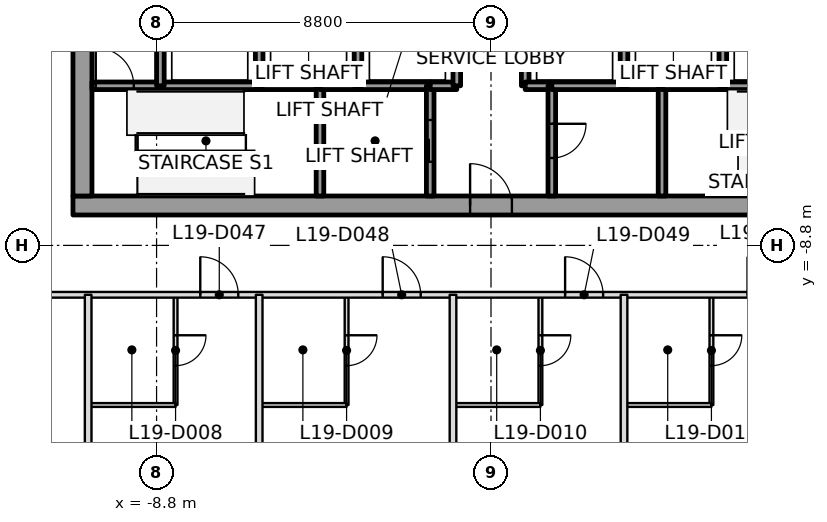
"""IFC4 building model, lengths in metres.
Left out: names, types, materials, properties, quantities, classifications, styles, units other than length and angle.
Written with IfcOpenShell. Run it as: python <this file> out.ifc"""

import sys

from ifc_helpers import new_model, si_unit, direction, frame, frame_2d, origin, place, context, subcontext, project, spatial, rectangle, extrude, element, fill, save


model = new_model("IFC4")
c1 = context("Model", 3, precision=1e-05, world=origin(), true_north=direction((0.0, 1.0)))
c2 = subcontext(c1, "Body", "Model", "MODEL_VIEW")
j1 = project(units=[si_unit("LENGTHUNIT", "METRE"), si_unit("PLANEANGLEUNIT", "RADIAN")], contexts=[c1])
p1 = place(None, origin())
s1 = spatial("IfcSite", under=j1, at=p1, CompositionType="ELEMENT")
p2 = place(p1, origin())
s2 = spatial("IfcBuilding", under=s1, at=p2, CompositionType="ELEMENT")
p3 = place(p2, frame((0.0, 0.0, 92.4)))
s3 = spatial("IfcBuildingStorey", under=s2, at=p3, CompositionType="ELEMENT", Elevation=92.4)
p4 = place(p3, frame((-11.0, -7.75, 0.0), z_axis=(0.0, 0.0, 1.0), x_axis=(1.0, 0.0, 0.0)))
e1 = element("IfcWall", 1, at=p4, inside=s3, PredefinedType="SHEAR", context=c2, shape_type="SweptSolid", body=[
    extrude(rectangle(XDim=22.0, YDim=0.5, at=frame_2d((11.0, 0.0))), origin(), (0.0, 0.0, 1.0), 3.7),
])
p5 = place(p4, frame((10.45, 0.0, 0.0)))
e2 = element("IfcOpeningElement", 2, at=p5, cuts=e1, PredefinedType="OPENING", context=c2, shape_type="SweptSolid", body=[
    extrude(rectangle(XDim=1.1, YDim=2.1, at=frame_2d((0.55, 1.05))), frame((0.0, 0.25, 0.0), z_axis=(0.0, -1.0, 0.0), x_axis=(1.0, 0.0, 0.0)), (0.0, 0.0, 1.0), 0.5),
])
p6 = place(p3, frame((-10.75, -7.5, 0.0), z_axis=(0.0, 0.0, 1.0), x_axis=(0.0, 1.0, 0.0)))
e3 = element("IfcWall", 3, at=p6, inside=s3, PredefinedType="SHEAR", context=c2, shape_type="SweptSolid", body=[
    extrude(rectangle(XDim=15.0, YDim=0.5, at=frame_2d((7.5, 0.0))), origin(), (0.0, 0.0, 1.0), 3.7),
])
p7 = place(p6, frame((6.6, 0.0, 0.0)))
e4 = element("IfcOpeningElement", 4, at=p7, cuts=e3, PredefinedType="OPENING", context=c2, shape_type="SweptSolid", body=[
    extrude(rectangle(XDim=1.8, YDim=2.1, at=frame_2d((0.9, 1.05))), frame((0.0, 0.25, 0.0), z_axis=(0.0, -1.0, 0.0), x_axis=(1.0, 0.0, 0.0)), (0.0, 0.0, 1.0), 0.5),
])
p8 = place(p3, frame((-10.5, -4.6, 0.0), z_axis=(0.0, 0.0, 1.0), x_axis=(1.0, 0.0, 0.0)))
e5 = element("IfcWall", 5, at=p8, inside=s3, PredefinedType="SOLIDWALL", context=c2, shape_type="SweptSolid", body=[
    extrude(rectangle(XDim=1.8, YDim=0.2, at=frame_2d((0.9, 0.0))), origin(), (0.0, 0.0, 1.0), 3.55),
])
p9 = place(p8, frame((0.1, 0.0, 0.0)))
e6 = element("IfcOpeningElement", 6, at=p9, cuts=e5, PredefinedType="OPENING", context=c2, shape_type="SweptSolid", body=[
    extrude(rectangle(XDim=1.0, YDim=2.1, at=frame_2d((0.5, 1.05))), frame((0.0, 0.1, 0.0), z_axis=(0.0, -1.0, 0.0), x_axis=(1.0, 0.0, 0.0)), (0.0, 0.0, 1.0), 0.2),
])
p10 = place(p3, frame((-8.7, -4.6, 0.0), z_axis=(0.0, 0.0, 1.0), x_axis=(1.0, 0.0, 0.0)))
e7 = element("IfcWall", 7, at=p10, inside=s3, PredefinedType="SOLIDWALL", context=c2, shape_type="SweptSolid", body=[
    extrude(rectangle(XDim=2.6, YDim=0.2, at=frame_2d((1.3, 0.0))), origin(), (0.0, 0.0, 1.0), 3.55),
])
p11 = place(p3, frame((-8.7, -4.6, 0.0), z_axis=(0.0, 0.0, 1.0), x_axis=(0.0, 1.0, 0.0)))
e8 = element("IfcWall", 8, at=p11, inside=s3, PredefinedType="SOLIDWALL", context=c2, shape_type="SweptSolid", body=[
    extrude(rectangle(XDim=2.8, YDim=0.2, at=frame_2d((1.4, 0.0))), origin(), (0.0, 0.0, 1.0), 3.55),
])
p12 = place(p3, frame((-6.1, -4.6, 0.0), z_axis=(0.0, 0.0, 1.0), x_axis=(1.0, 0.0, 0.0)))
e9 = element("IfcWall", 9, at=p12, inside=s3, PredefinedType="SOLIDWALL", context=c2, shape_type="SweptSolid", body=[
    extrude(rectangle(XDim=1.6, YDim=0.2, at=frame_2d((0.8, 0.0))), origin(), (0.0, 0.0, 1.0), 3.55),
])
p13 = place(p3, frame((-6.1, -4.6, 0.0), z_axis=(0.0, 0.0, 1.0), x_axis=(0.0, 1.0, 0.0)))
e10 = element("IfcWall", 10, at=p13, inside=s3, PredefinedType="SOLIDWALL", context=c2, shape_type="SweptSolid", body=[
    extrude(rectangle(XDim=2.8, YDim=0.2, at=frame_2d((1.4, 0.0))), origin(), (0.0, 0.0, 1.0), 3.55),
])
p14 = place(p3, frame((-4.5, -4.6, 0.0), z_axis=(0.0, 0.0, 1.0), x_axis=(0.0, -1.0, 0.0)))
e11 = element("IfcWall", 11, at=p14, inside=s3, PredefinedType="SOLIDWALL", context=c2, shape_type="SweptSolid", body=[
    extrude(rectangle(XDim=2.9, YDim=0.2, at=frame_2d((1.45, 0.0))), origin(), (0.0, 0.0, 1.0), 3.55),
])
p15 = place(p3, frame((-4.5, -4.6, 0.0), z_axis=(0.0, 0.0, 1.0), x_axis=(1.0, 0.0, 0.0)))
e12 = element("IfcWall", 12, at=p15, inside=s3, PredefinedType="SOLIDWALL", context=c2, shape_type="SweptSolid", body=[
    extrude(rectangle(XDim=1.0, YDim=0.2, at=frame_2d((0.5, 0.0))), origin(), (0.0, 0.0, 1.0), 3.55),
])
p16 = place(p3, frame((-3.5, -4.6, 0.0), z_axis=(0.0, 0.0, 1.0), x_axis=(1.0, 0.0, 0.0)))
e13 = element("IfcWall", 13, at=p16, inside=s3, PredefinedType="SOLIDWALL", context=c2, shape_type="SweptSolid", body=[
    extrude(rectangle(XDim=1.9, YDim=0.2, at=frame_2d((0.95, 0.0))), origin(), (0.0, 0.0, 1.0), 3.55),
])
p17 = place(p3, frame((-3.5, -4.6, 0.0), z_axis=(0.0, 0.0, 1.0), x_axis=(0.0, 1.0, 0.0)))
e14 = element("IfcWall", 14, at=p17, inside=s3, PredefinedType="SOLIDWALL", context=c2, shape_type="SweptSolid", body=[
    extrude(rectangle(XDim=2.8, YDim=0.2, at=frame_2d((1.4, 0.0))), origin(), (0.0, 0.0, 1.0), 3.55),
])
p18 = place(p3, frame((-1.6, -7.5, 0.0), z_axis=(0.0, 0.0, 1.0), x_axis=(0.0, 1.0, 0.0)))
e15 = element("IfcWall", 15, at=p18, inside=s3, PredefinedType="SOLIDWALL", context=c2, shape_type="SweptSolid", body=[
    extrude(rectangle(XDim=2.9, YDim=0.2, at=frame_2d((1.45, 0.0))), origin(), (0.0, 0.0, 1.0), 3.55),
])
p19 = place(p18, frame((0.9, 0.0, 0.0)))
e16 = element("IfcOpeningElement", 16, at=p19, cuts=e15, PredefinedType="OPENING", context=c2, shape_type="SweptSolid", body=[
    extrude(rectangle(XDim=1.1, YDim=2.1, at=frame_2d((0.55, 1.05))), frame((0.0, 0.1, 0.0), z_axis=(0.0, -1.0, 0.0), x_axis=(1.0, 0.0, 0.0)), (0.0, 0.0, 1.0), 0.2),
])
p20 = place(p3, frame((-1.6, -4.6, 0.0), z_axis=(0.0, 0.0, 1.0), x_axis=(1.0, 0.0, 0.0)))
e17 = element("IfcWall", 17, at=p20, inside=s3, PredefinedType="SOLIDWALL", context=c2, shape_type="SweptSolid", body=[
    extrude(rectangle(XDim=0.7, YDim=0.2, at=frame_2d((0.35, 0.0))), origin(), (0.0, 0.0, 1.0), 3.55),
])
for number, where, z_axis, x_axis in (
    (18, (-0.9, -4.6, 0.0), (0.0, 0.0, 1.0), (0.0, 1.0, 0.0)),
    (19, (0.9, -1.8, 0.0), (0.0, 0.0, 1.0), (0.0, -1.0, 0.0)),
):
    element("IfcWall", number, at=place(p3, frame(where, z_axis=z_axis, x_axis=x_axis)), inside=s3, PredefinedType="SOLIDWALL", context=c2, shape_type="SweptSolid", body=[
        extrude(rectangle(XDim=2.8, YDim=0.2, at=frame_2d((1.4, 0.0))), origin(), (0.0, 0.0, 1.0), 3.55),
    ])
p21 = place(p3, frame((0.9, -4.6, 0.0), z_axis=(0.0, 0.0, 1.0), x_axis=(1.0, 0.0, 0.0)))
e20 = element("IfcWall", 20, at=p21, inside=s3, PredefinedType="SOLIDWALL", context=c2, shape_type="SweptSolid", body=[
    extrude(rectangle(XDim=0.7, YDim=0.2, at=frame_2d((0.35, 0.0))), origin(), (0.0, 0.0, 1.0), 3.55),
])
p22 = place(p3, frame((1.6, -4.6, 0.0), z_axis=(0.0, 0.0, 1.0), x_axis=(0.0, -1.0, 0.0)))
e21 = element("IfcWall", 21, at=p22, inside=s3, PredefinedType="SOLIDWALL", context=c2, shape_type="SweptSolid", body=[
    extrude(rectangle(XDim=2.9, YDim=0.2, at=frame_2d((1.45, 0.0))), origin(), (0.0, 0.0, 1.0), 3.55),
])
p23 = place(p22, frame((1.0, 0.0, 0.0)))
e22 = element("IfcOpeningElement", 22, at=p23, cuts=e21, PredefinedType="OPENING", context=c2, shape_type="SweptSolid", body=[
    extrude(rectangle(XDim=0.9, YDim=2.1, at=frame_2d((0.45, 1.05))), frame((0.0, 0.1, 0.0), z_axis=(0.0, -1.0, 0.0), x_axis=(1.0, 0.0, 0.0)), (0.0, 0.0, 1.0), 0.2),
])
p24 = place(p3, frame((3.5, -4.6, 0.0), z_axis=(0.0, 0.0, 1.0), x_axis=(-1.0, 0.0, 0.0)))
e23 = element("IfcWall", 23, at=p24, inside=s3, PredefinedType="SOLIDWALL", context=c2, shape_type="SweptSolid", body=[
    extrude(rectangle(XDim=1.9, YDim=0.2, at=frame_2d((0.95, 0.0))), origin(), (0.0, 0.0, 1.0), 3.55),
])
p25 = place(p3, frame((4.5, -4.6, 0.0), z_axis=(0.0, 0.0, 1.0), x_axis=(-1.0, 0.0, 0.0)))
e24 = element("IfcWall", 24, at=p25, inside=s3, PredefinedType="SOLIDWALL", context=c2, shape_type="SweptSolid", body=[
    extrude(rectangle(XDim=1.0, YDim=0.2, at=frame_2d((0.5, 0.0))), origin(), (0.0, 0.0, 1.0), 3.55),
])
p26 = place(p3, frame((3.5, -4.6, 0.0), z_axis=(0.0, 0.0, 1.0), x_axis=(0.0, 1.0, 0.0)))
e25 = element("IfcWall", 25, at=p26, inside=s3, PredefinedType="SOLIDWALL", context=c2, shape_type="SweptSolid", body=[
    extrude(rectangle(XDim=2.8, YDim=0.2, at=frame_2d((1.4, 0.0))), origin(), (0.0, 0.0, 1.0), 3.55),
])
p27 = place(p3, frame((4.5, -7.5, 0.0), z_axis=(0.0, 0.0, 1.0), x_axis=(0.0, 1.0, 0.0)))
e26 = element("IfcWall", 26, at=p27, inside=s3, PredefinedType="SOLIDWALL", context=c2, shape_type="SweptSolid", body=[
    extrude(rectangle(XDim=2.9, YDim=0.2, at=frame_2d((1.45, 0.0))), origin(), (0.0, 0.0, 1.0), 3.55),
])
p28 = place(p3, frame((4.5, -4.6, 0.0), z_axis=(0.0, 0.0, 1.0), x_axis=(1.0, 0.0, 0.0)))
e27 = element("IfcWall", 27, at=p28, inside=s3, PredefinedType="SOLIDWALL", context=c2, shape_type="SweptSolid", body=[
    extrude(rectangle(XDim=1.6, YDim=0.2, at=frame_2d((0.8, 0.0))), origin(), (0.0, 0.0, 1.0), 3.55),
])
p29 = place(p3, frame((6.1, -4.6, 0.0), z_axis=(0.0, 0.0, 1.0), x_axis=(1.0, 0.0, 0.0)))
e28 = element("IfcWall", 28, at=p29, inside=s3, PredefinedType="SOLIDWALL", context=c2, shape_type="SweptSolid", body=[
    extrude(rectangle(XDim=2.6, YDim=0.2, at=frame_2d((1.3, 0.0))), origin(), (0.0, 0.0, 1.0), 3.55),
])
p30 = place(p3, frame((6.1, -4.6, 0.0), z_axis=(0.0, 0.0, 1.0), x_axis=(0.0, 1.0, 0.0)))
e29 = element("IfcWall", 29, at=p30, inside=s3, PredefinedType="SOLIDWALL", context=c2, shape_type="SweptSolid", body=[
    extrude(rectangle(XDim=2.8, YDim=0.2, at=frame_2d((1.4, 0.0))), origin(), (0.0, 0.0, 1.0), 3.55),
])
p31 = place(p3, frame((-10.6, -10.1, 0.0), z_axis=(0.0, 0.0, 1.0), x_axis=(0.0, -1.0, 0.0)))
e30 = element("IfcWall", 30, at=p31, inside=s3, PredefinedType="PARTITIONING", context=c2, shape_type="SweptSolid", body=[
    extrude(rectangle(XDim=12.268, YDim=0.175, at=frame_2d((6.134, 0.0))), origin(), (0.0, 0.0, 1.0), 2.934),
])
p32 = place(p3, frame((-6.1, -10.1, 0.0), z_axis=(0.0, 0.0, 1.0), x_axis=(0.0, -1.0, 0.0)))
e31 = element("IfcWall", 31, at=p32, inside=s3, PredefinedType="PARTITIONING", context=c2, shape_type="SweptSolid", body=[
    extrude(rectangle(XDim=12.547, YDim=0.175, at=frame_2d((6.273, 0.0))), origin(), (0.0, 0.0, 1.0), 2.934),
])
p33 = place(p3, frame((-1.0, -10.1, 0.0), z_axis=(0.0, 0.0, 1.0), x_axis=(0.0, -1.0, 0.0)))
e32 = element("IfcWall", 32, at=p33, inside=s3, PredefinedType="PARTITIONING", context=c2, shape_type="SweptSolid", body=[
    extrude(rectangle(XDim=12.678, YDim=0.175, at=frame_2d((6.339, 0.0))), origin(), (0.0, 0.0, 1.0), 2.934),
])
p34 = place(p3, frame((3.5, -10.1, 0.0), z_axis=(0.0, 0.0, 1.0), x_axis=(0.0, -1.0, 0.0)))
e33 = element("IfcWall", 33, at=p34, inside=s3, PredefinedType="PARTITIONING", context=c2, shape_type="SweptSolid", body=[
    extrude(rectangle(XDim=12.638, YDim=0.175, at=frame_2d((6.319, 0.0))), origin(), (0.0, 0.0, 1.0), 2.934),
])
p35 = place(p3, frame((-13.02, -10.1, 0.0), z_axis=(0.0, 0.0, 1.0), x_axis=(1.0, 0.0, 0.0)))
e34 = element("IfcWall", 34, at=p35, inside=s3, PredefinedType="PARTITIONING", context=c2, shape_type="SweptSolid", body=[
    extrude(rectangle(XDim=26.04, YDim=0.15, at=frame_2d((13.02, 0.0))), origin(), (0.0, 0.0, 1.0), 2.947),
])
p36 = place(p35, frame((5.37, 0.0, 0.0)))
e35 = element("IfcOpeningElement", 35, at=p36, cuts=e34, PredefinedType="OPENING", context=c2, shape_type="SweptSolid", body=[
    extrude(rectangle(XDim=1.0, YDim=2.1, at=frame_2d((0.5, 1.05))), frame((0.0, 0.075, 0.0), z_axis=(0.0, -1.0, 0.0), x_axis=(1.0, 0.0, 0.0)), (0.0, 0.0, 1.0), 0.15),
])
p37 = place(p35, frame((10.17, 0.0, 0.0)))
e36 = element("IfcOpeningElement", 36, at=p37, cuts=e34, PredefinedType="OPENING", context=c2, shape_type="SweptSolid", body=[
    extrude(rectangle(XDim=1.0, YDim=2.1, at=frame_2d((0.5, 1.05))), frame((0.0, 0.075, 0.0), z_axis=(0.0, -1.0, 0.0), x_axis=(1.0, 0.0, 0.0)), (0.0, 0.0, 1.0), 0.15),
])
p38 = place(p35, frame((14.97, 0.0, 0.0)))
e37 = element("IfcOpeningElement", 37, at=p38, cuts=e34, PredefinedType="OPENING", context=c2, shape_type="SweptSolid", body=[
    extrude(rectangle(XDim=1.0, YDim=2.1, at=frame_2d((0.5, 1.05))), frame((0.0, 0.075, 0.0), z_axis=(0.0, -1.0, 0.0), x_axis=(1.0, 0.0, 0.0)), (0.0, 0.0, 1.0), 0.15),
])
p39 = place(p35, frame((19.77, 0.0, 0.0)))
e38 = element("IfcOpeningElement", 38, at=p39, cuts=e34, PredefinedType="OPENING", context=c2, shape_type="SweptSolid", body=[
    extrude(rectangle(XDim=1.0, YDim=2.1, at=frame_2d((0.5, 1.05))), frame((0.0, 0.075, 0.0), z_axis=(0.0, -1.0, 0.0), x_axis=(1.0, 0.0, 0.0)), (0.0, 0.0, 1.0), 0.15),
])
p40 = place(p3, frame((-8.3, -10.13, 0.0), z_axis=(0.0, 0.0, 1.0), x_axis=(0.0, -1.0, 0.0)))
e39 = element("IfcWall", 39, at=p40, inside=s3, PredefinedType="PARTITIONING", context=c2, shape_type="SweptSolid", body=[
    extrude(rectangle(XDim=2.87, YDim=0.1, at=frame_2d((1.435, 0.0))), origin(), (0.0, 0.0, 1.0), 3.15),
])
p41 = place(p40, frame((1.035, 0.0, 0.0)))
e40 = element("IfcOpeningElement", 40, at=p41, cuts=e39, PredefinedType="OPENING", context=c2, shape_type="SweptSolid", body=[
    extrude(rectangle(XDim=0.8, YDim=2.1, at=frame_2d((0.4, 1.05))), frame((0.0, 0.05, 0.0), z_axis=(0.0, -1.0, 0.0), x_axis=(1.0, 0.0, 0.0)), (0.0, 0.0, 1.0), 0.1),
])
p42 = place(p3, frame((-8.3, -13.0, 0.0), z_axis=(0.0, 0.0, 1.0), x_axis=(-1.0, 0.0, 0.0)))
e41 = element("IfcWall", 41, at=p42, inside=s3, PredefinedType="PARTITIONING", context=c2, shape_type="SweptSolid", body=[
    extrude(rectangle(XDim=2.27, YDim=0.1, at=frame_2d((1.135, 0.0))), origin(), (0.0, 0.0, 1.0), 3.15),
])
p43 = place(p3, frame((-3.8, -10.13, 0.0), z_axis=(0.0, 0.0, 1.0), x_axis=(0.0, -1.0, 0.0)))
e42 = element("IfcWall", 42, at=p43, inside=s3, PredefinedType="PARTITIONING", context=c2, shape_type="SweptSolid", body=[
    extrude(rectangle(XDim=2.87, YDim=0.1, at=frame_2d((1.435, 0.0))), origin(), (0.0, 0.0, 1.0), 3.15),
])
p44 = place(p43, frame((1.035, 0.0, 0.0)))
e43 = element("IfcOpeningElement", 43, at=p44, cuts=e42, PredefinedType="OPENING", context=c2, shape_type="SweptSolid", body=[
    extrude(rectangle(XDim=0.8, YDim=2.1, at=frame_2d((0.4, 1.05))), frame((0.0, 0.05, 0.0), z_axis=(0.0, -1.0, 0.0), x_axis=(1.0, 0.0, 0.0)), (0.0, 0.0, 1.0), 0.1),
])
p45 = place(p3, frame((-3.8, -13.0, 0.0), z_axis=(0.0, 0.0, 1.0), x_axis=(-1.0, 0.0, 0.0)))
e44 = element("IfcWall", 44, at=p45, inside=s3, PredefinedType="PARTITIONING", context=c2, shape_type="SweptSolid", body=[
    extrude(rectangle(XDim=2.27, YDim=0.1, at=frame_2d((1.135, 0.0))), origin(), (0.0, 0.0, 1.0), 3.017),
])
p46 = place(p3, frame((1.3, -10.13, 0.0), z_axis=(0.0, 0.0, 1.0), x_axis=(0.0, -1.0, 0.0)))
e45 = element("IfcWall", 45, at=p46, inside=s3, PredefinedType="PARTITIONING", context=c2, shape_type="SweptSolid", body=[
    extrude(rectangle(XDim=2.87, YDim=0.1, at=frame_2d((1.435, 0.0))), origin(), (0.0, 0.0, 1.0), 3.15),
])
p47 = place(p46, frame((1.035, 0.0, 0.0)))
e46 = element("IfcOpeningElement", 46, at=p47, cuts=e45, PredefinedType="OPENING", context=c2, shape_type="SweptSolid", body=[
    extrude(rectangle(XDim=0.8, YDim=2.1, at=frame_2d((0.4, 1.05))), frame((0.0, 0.05, 0.0), z_axis=(0.0, -1.0, 0.0), x_axis=(1.0, 0.0, 0.0)), (0.0, 0.0, 1.0), 0.1),
])
p48 = place(p3, frame((1.3, -13.0, 0.0), z_axis=(0.0, 0.0, 1.0), x_axis=(-1.0, 0.0, 0.0)))
e47 = element("IfcWall", 47, at=p48, inside=s3, PredefinedType="PARTITIONING", context=c2, shape_type="SweptSolid", body=[
    extrude(rectangle(XDim=2.27, YDim=0.1, at=frame_2d((1.135, 0.0))), origin(), (0.0, 0.0, 1.0), 3.15),
])
p49 = place(p3, frame((5.8, -10.13, 0.0), z_axis=(0.0, 0.0, 1.0), x_axis=(0.0, -1.0, 0.0)))
e48 = element("IfcWall", 48, at=p49, inside=s3, PredefinedType="PARTITIONING", context=c2, shape_type="SweptSolid", body=[
    extrude(rectangle(XDim=2.87, YDim=0.1, at=frame_2d((1.435, 0.0))), origin(), (0.0, 0.0, 1.0), 3.15),
])
p50 = place(p49, frame((1.035, 0.0, 0.0)))
e49 = element("IfcOpeningElement", 49, at=p50, cuts=e48, PredefinedType="OPENING", context=c2, shape_type="SweptSolid", body=[
    extrude(rectangle(XDim=0.8, YDim=2.1, at=frame_2d((0.4, 1.05))), frame((0.0, 0.05, 0.0), z_axis=(0.0, -1.0, 0.0), x_axis=(1.0, 0.0, 0.0)), (0.0, 0.0, 1.0), 0.1),
])
p51 = place(p3, frame((5.8, -13.0, 0.0), z_axis=(0.0, 0.0, 1.0), x_axis=(-1.0, 0.0, 0.0)))
e50 = element("IfcWall", 50, at=p51, inside=s3, PredefinedType="PARTITIONING", context=c2, shape_type="SweptSolid", body=[
    extrude(rectangle(XDim=2.27, YDim=0.1, at=frame_2d((1.135, 0.0))), origin(), (0.0, 0.0, 1.0), 3.017),
])
p52 = place(p36, origin())
e51 = element("IfcDoor", 51, at=p52, inside=s3, OperationType="SINGLE_SWING_LEFT", PredefinedType="DOOR", context=c2, shape_type="SweptSolid", body=[
    extrude(rectangle(XDim=1.0, YDim=2.1, at=frame_2d((0.5, 1.05))), frame((0.0, 0.025, 0.0), z_axis=(0.0, -1.0, 0.0), x_axis=(1.0, 0.0, 0.0)), (0.0, 0.0, 1.0), 0.05),
])
fill(e35, e51)
p53 = place(p41, origin())
e52 = element("IfcDoor", 52, at=p53, inside=s3, OperationType="SINGLE_SWING_LEFT", PredefinedType="DOOR", context=c2, shape_type="SweptSolid", body=[
    extrude(rectangle(XDim=0.8, YDim=2.1, at=frame_2d((0.4, 1.05))), frame((0.0, 0.025, 0.0), z_axis=(0.0, -1.0, 0.0), x_axis=(1.0, 0.0, 0.0)), (0.0, 0.0, 1.0), 0.05),
])
fill(e40, e52)
p54 = place(p37, origin())
e53 = element("IfcDoor", 53, at=p54, inside=s3, OperationType="SINGLE_SWING_LEFT", PredefinedType="DOOR", context=c2, shape_type="SweptSolid", body=[
    extrude(rectangle(XDim=1.0, YDim=2.1, at=frame_2d((0.5, 1.05))), frame((0.0, 0.025, 0.0), z_axis=(0.0, -1.0, 0.0), x_axis=(1.0, 0.0, 0.0)), (0.0, 0.0, 1.0), 0.05),
])
fill(e36, e53)
p55 = place(p44, origin())
e54 = element("IfcDoor", 54, at=p55, inside=s3, OperationType="SINGLE_SWING_RIGHT", PredefinedType="DOOR", context=c2, shape_type="SweptSolid", body=[
    extrude(rectangle(XDim=0.8, YDim=2.1, at=frame_2d((0.4, 1.05))), frame((0.0, 0.025, 0.0), z_axis=(0.0, -1.0, 0.0), x_axis=(1.0, 0.0, 0.0)), (0.0, 0.0, 1.0), 0.05),
])
fill(e43, e54)
p56 = place(p38, origin())
e55 = element("IfcDoor", 55, at=p56, inside=s3, OperationType="SINGLE_SWING_LEFT", PredefinedType="DOOR", context=c2, shape_type="SweptSolid", body=[
    extrude(rectangle(XDim=1.0, YDim=2.1, at=frame_2d((0.5, 1.05))), frame((0.0, 0.025, 0.0), z_axis=(0.0, -1.0, 0.0), x_axis=(1.0, 0.0, 0.0)), (0.0, 0.0, 1.0), 0.05),
])
fill(e37, e55)
p57 = place(p47, origin())
e56 = element("IfcDoor", 56, at=p57, inside=s3, OperationType="SINGLE_SWING_LEFT", PredefinedType="DOOR", context=c2, shape_type="SweptSolid", body=[
    extrude(rectangle(XDim=0.8, YDim=2.1, at=frame_2d((0.4, 1.05))), frame((0.0, 0.025, 0.0), z_axis=(0.0, -1.0, 0.0), x_axis=(1.0, 0.0, 0.0)), (0.0, 0.0, 1.0), 0.05),
])
fill(e46, e56)
p58 = place(p50, origin())
e57 = element("IfcDoor", 57, at=p58, inside=s3, OperationType="SINGLE_SWING_RIGHT", PredefinedType="DOOR", context=c2, shape_type="SweptSolid", body=[
    extrude(rectangle(XDim=0.8, YDim=2.1, at=frame_2d((0.4, 1.05))), frame((0.0, 0.025, 0.0), z_axis=(0.0, -1.0, 0.0), x_axis=(1.0, 0.0, 0.0)), (0.0, 0.0, 1.0), 0.05),
])
fill(e49, e57)
p59 = place(p19, origin())
e58 = element("IfcDoor", 58, at=p59, inside=s3, OperationType="SLIDING_TO_LEFT", PredefinedType="DOOR", context=c2, shape_type="SweptSolid", body=[
    extrude(rectangle(XDim=1.1, YDim=2.1, at=frame_2d((0.55, 1.05))), frame((0.0, 0.025, 0.0), z_axis=(0.0, -1.0, 0.0), x_axis=(1.0, 0.0, 0.0)), (0.0, 0.0, 1.0), 0.05),
])
fill(e16, e58)
p60 = place(p9, origin())
e59 = element("IfcDoor", 59, at=p60, inside=s3, OperationType="SINGLE_SWING_LEFT", PredefinedType="DOOR", context=c2, shape_type="SweptSolid", body=[
    extrude(rectangle(XDim=1.0, YDim=2.1, at=frame_2d((0.5, 1.05))), frame((0.0, 0.025, 0.0), z_axis=(0.0, -1.0, 0.0), x_axis=(1.0, 0.0, 0.0)), (0.0, 0.0, 1.0), 0.05),
])
fill(e6, e59)
p61 = place(p23, origin())
e60 = element("IfcDoor", 60, at=p61, inside=s3, OperationType="SINGLE_SWING_LEFT", PredefinedType="DOOR", context=c2, shape_type="SweptSolid", body=[
    extrude(rectangle(XDim=0.9, YDim=2.1, at=frame_2d((0.45, 1.05))), frame((0.0, 0.025, 0.0), z_axis=(0.0, -1.0, 0.0), x_axis=(1.0, 0.0, 0.0)), (0.0, 0.0, 1.0), 0.05),
])
fill(e22, e60)
p62 = place(p5, origin())
e61 = element("IfcDoor", 61, at=p62, inside=s3, OperationType="SINGLE_SWING_RIGHT", PredefinedType="DOOR", context=c2, shape_type="SweptSolid", body=[
    extrude(rectangle(XDim=1.1, YDim=2.1, at=frame_2d((0.55, 1.05))), frame((0.0, 0.025, 0.0), z_axis=(0.0, -1.0, 0.0), x_axis=(1.0, 0.0, 0.0)), (0.0, 0.0, 1.0), 0.05),
])
fill(e2, e61)
save(model, sys.argv[1])
